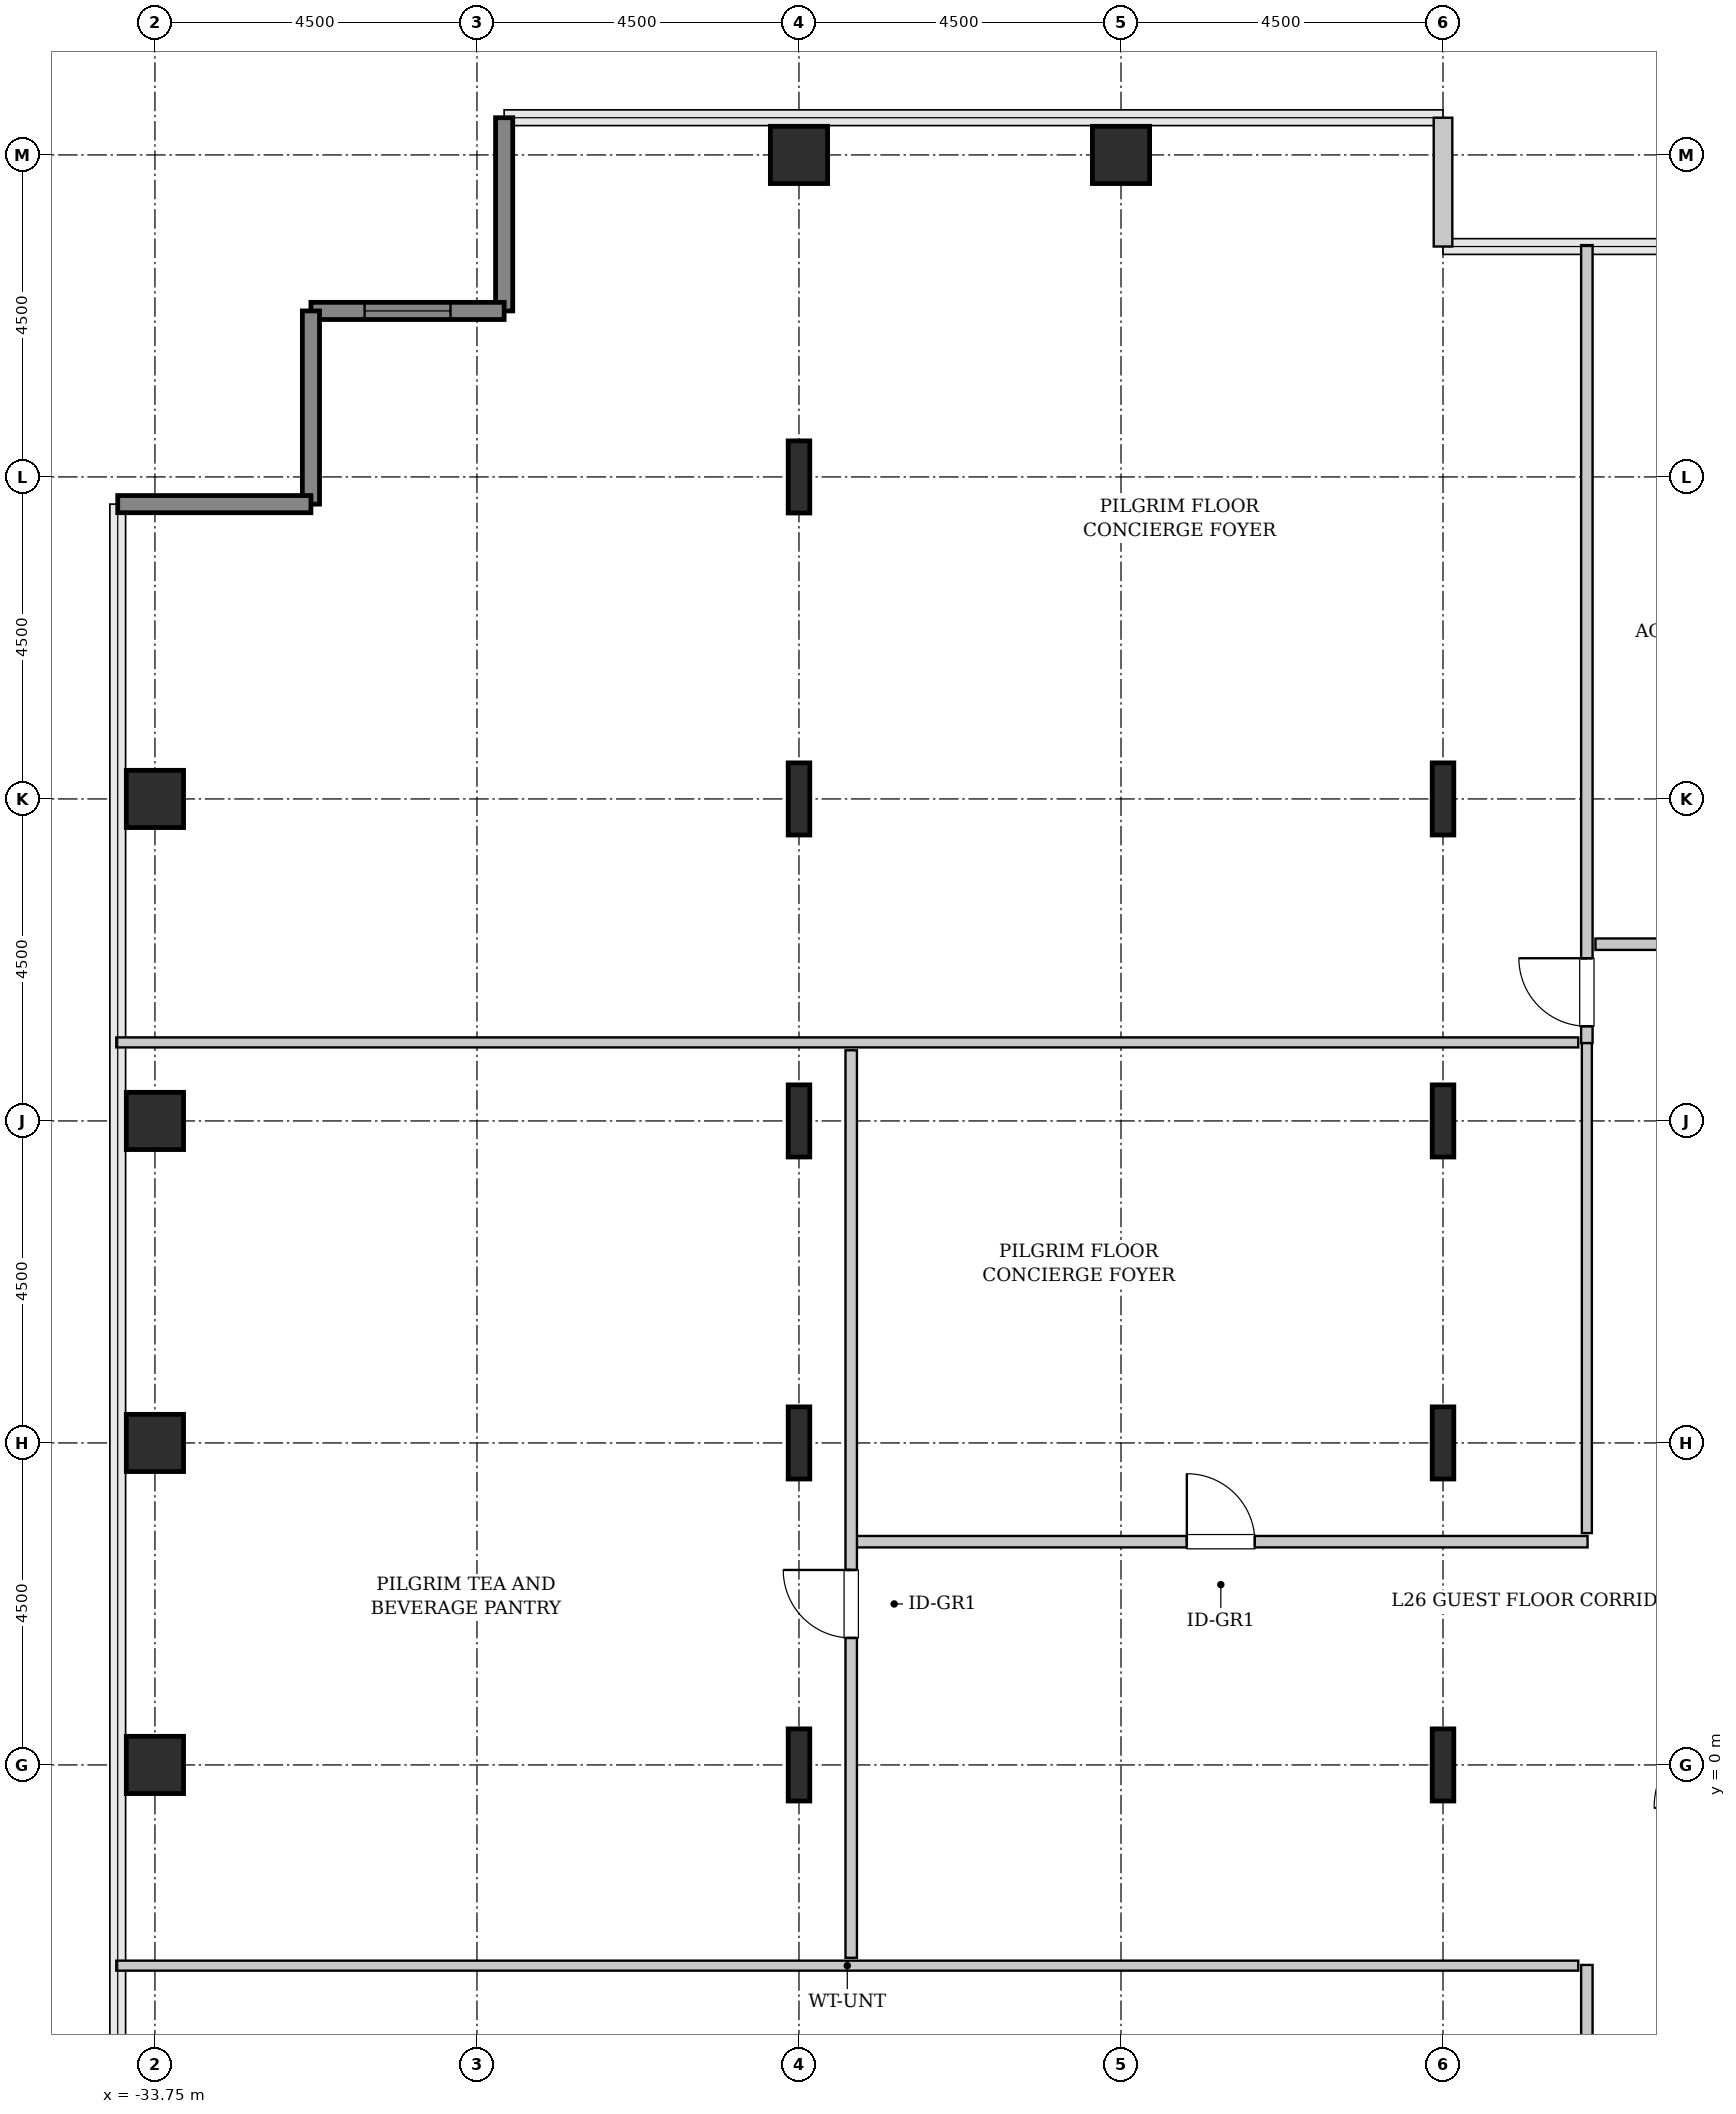
"""IFC4 building model, lengths in metres.
Left out: names, types, materials, properties, quantities, classifications, styles, units other than length and angle.
Written with IfcOpenShell. Run it as: python <this file> out.ifc"""

import sys

from ifc_helpers import new_model, si_unit, direction, frame, frame_2d, origin, origin_2d, place, context, subcontext, project, spatial, rectangle, hollow_rectangle, i_section, extrude, source, transform, mapped, element, fill, save


model = new_model("IFC4")
c1 = context("Model", 3, precision=1e-05, world=origin(), true_north=direction((0.0, 1.0)))
c2 = subcontext(c1, "Body", "Model", "MODEL_VIEW")
j1 = project(units=[si_unit("LENGTHUNIT", "METRE"), si_unit("PLANEANGLEUNIT", "RADIAN")], contexts=[c1])
p1 = place(None, origin())
s1 = spatial("IfcSite", under=j1, at=p1, CompositionType="ELEMENT")
p2 = place(p1, origin())
s2 = spatial("IfcBuilding", under=s1, at=p2, CompositionType="ELEMENT")
p3 = place(p2, frame((0.0, 0.0, 109.8)))
s3 = spatial("IfcBuildingStorey", under=s2, at=p3, CompositionType="ELEMENT", Elevation=109.8)
m1 = source(origin(), c2, "Body", "SweptSolid", [
    extrude(hollow_rectangle(XDim=0.8, YDim=0.8, WallThickness=0.04, InnerFilletRadius=0.04, OuterFilletRadius=0.08, at=origin_2d()), origin(), (0.0, 0.0, 1.0), 3.8),
])
for number, where, z_axis, x_axis in (
    (1, (-33.75, 0.0, 0.0), (0.0, 0.0, 1.0), (1.0, 0.0, 0.0)),
    (2, (-33.75, 4.5, 0.0), (0.0, 0.0, 1.0), (1.0, 0.0, 0.0)),
    (3, (-33.75, 9.0, 0.0), (0.0, 0.0, 1.0), (1.0, 0.0, 0.0)),
    (4, (-33.75, 13.5, 0.0), (0.0, 0.0, 1.0), (1.0, 0.0, 0.0)),
):
    element("IfcColumn", number, at=place(p3, frame(where, z_axis=z_axis, x_axis=x_axis)), inside=s3, PredefinedType="COLUMN", context=c2, shape_type="MappedRepresentation", body=[
        mapped(m1, transform((0.0, 0.0, 0.0), x_axis=(1.0, 0.0, 0.0), y_axis=(0.0, 1.0, 0.0), z_axis=(0.0, 0.0, 1.0), scale=1.0)),
    ])
m2 = source(origin(), c2, "Body", "SweptSolid", [
    extrude(i_section(OverallWidth=0.302, OverallDepth=1.008, WebThickness=0.021, FlangeThickness=0.04, FilletRadius=0.03, at=origin_2d()), origin(), (0.0, 0.0, 1.0), 3.8),
])
for number, where, z_axis, x_axis in (
    (5, (-24.75, 0.0, 0.0), (0.0, 0.0, 1.0), (1.0, 0.0, 0.0)),
    (6, (-24.75, 4.5, 0.0), (0.0, 0.0, 1.0), (1.0, 0.0, 0.0)),
    (7, (-24.75, 9.0, 0.0), (0.0, 0.0, 1.0), (1.0, 0.0, 0.0)),
    (8, (-24.75, 13.5, 0.0), (0.0, 0.0, 1.0), (1.0, 0.0, 0.0)),
    (9, (-24.75, 18.0, 0.0), (0.0, 0.0, 1.0), (1.0, 0.0, 0.0)),
):
    element("IfcColumn", number, at=place(p3, frame(where, z_axis=z_axis, x_axis=x_axis)), inside=s3, PredefinedType="COLUMN", context=c2, shape_type="MappedRepresentation", body=[
        mapped(m2, transform((0.0, 0.0, 0.0), x_axis=(1.0, 0.0, 0.0), y_axis=(0.0, 1.0, 0.0), z_axis=(0.0, 0.0, 1.0), scale=1.0)),
    ])
for number, where, z_axis, x_axis in (
    (10, (-24.75, 22.5, 0.0), (0.0, 0.0, 1.0), (1.0, 0.0, 0.0)),
    (11, (-20.25, 22.5, 0.0), (0.0, 0.0, 1.0), (1.0, 0.0, 0.0)),
):
    element("IfcColumn", number, at=place(p3, frame(where, z_axis=z_axis, x_axis=x_axis)), inside=s3, PredefinedType="COLUMN", context=c2, shape_type="MappedRepresentation", body=[
        mapped(m1, transform((0.0, 0.0, 0.0), x_axis=(1.0, 0.0, 0.0), y_axis=(0.0, 1.0, 0.0), z_axis=(0.0, 0.0, 1.0), scale=1.0)),
    ])
for number, where, z_axis, x_axis in (
    (12, (-15.75, 0.0, 0.0), (0.0, 0.0, 1.0), (1.0, 0.0, 0.0)),
    (13, (-15.75, 4.5, 0.0), (0.0, 0.0, 1.0), (1.0, 0.0, 0.0)),
    (14, (-15.75, 9.0, 0.0), (0.0, 0.0, 1.0), (1.0, 0.0, 0.0)),
    (15, (-15.75, 13.5, 0.0), (0.0, 0.0, 1.0), (1.0, 0.0, 0.0)),
):
    element("IfcColumn", number, at=place(p3, frame(where, z_axis=z_axis, x_axis=x_axis)), inside=s3, PredefinedType="COLUMN", context=c2, shape_type="MappedRepresentation", body=[
        mapped(m2, transform((0.0, 0.0, 0.0), x_axis=(1.0, 0.0, 0.0), y_axis=(0.0, 1.0, 0.0), z_axis=(0.0, 0.0, 1.0), scale=1.0)),
    ])
m3 = source(origin(), c2, "Body", "SweptSolid", [
    extrude(rectangle(XDim=1.8, YDim=0.26, at=frame_2d((0.9, 0.0))), origin(), (0.0, 0.0, 1.0), 3.55),
])
p4 = place(p3, frame((-15.75, 21.22, 0.0), z_axis=(0.0, 0.0, 1.0), x_axis=(0.0, 1.0, 0.0)))
e16 = element("IfcWall", 16, at=p4, inside=s3, PredefinedType="SOLIDWALL", context=c2, shape_type="MappedRepresentation", body=[
    mapped(m3, transform((0.0, 0.0, 0.0), x_axis=(1.0, 0.0, 0.0), y_axis=(0.0, 1.0, 0.0), z_axis=(0.0, 0.0, 1.0), scale=1.0)),
])
m4 = source(origin(), c2, "Body", "SweptSolid", [
    extrude(rectangle(XDim=2.7, YDim=0.24, at=frame_2d((1.35, 0.0))), origin(), (0.0, 0.0, 1.0), 3.55),
])
p5 = place(p3, frame((-28.87, 23.02, 0.0), z_axis=(0.0, 0.0, 1.0), x_axis=(0.0, -1.0, 0.0)))
e17 = element("IfcWall", 17, at=p5, inside=s3, PredefinedType="SHEAR", context=c2, shape_type="MappedRepresentation", body=[
    mapped(m4, transform((0.0, 0.0, 0.0), x_axis=(1.0, 0.0, 0.0), y_axis=(0.0, 1.0, 0.0), z_axis=(0.0, 0.0, 1.0), scale=1.0)),
])
p6 = place(p3, frame((-28.87, 20.32, 0.0), z_axis=(0.0, 0.0, 1.0), x_axis=(-1.0, 0.0, 0.0)))
e18 = element("IfcWall", 18, at=p6, inside=s3, PredefinedType="SHEAR", context=c2, shape_type="MappedRepresentation", body=[
    mapped(m4, transform((0.0, 0.0, 0.0), x_axis=(1.0, 0.0, 0.0), y_axis=(0.0, 1.0, 0.0), z_axis=(0.0, 0.0, 1.0), scale=1.0)),
])
p7 = place(p6, frame((0.75, 0.0, 0.85)))
e19 = element("IfcOpeningElement", 19, at=p7, cuts=e18, PredefinedType="OPENING", context=c2, shape_type="SweptSolid", body=[
    extrude(rectangle(XDim=1.2, YDim=1.8, at=frame_2d((0.6, 0.9))), frame((0.0, 0.13, 0.0), z_axis=(0.0, -1.0, 0.0), x_axis=(1.0, 0.0, 0.0)), (0.0, 0.0, 1.0), 0.26),
])
for number, where, z_axis, x_axis in (
    (20, (-31.57, 20.32, 0.0), (0.0, 0.0, 1.0), (0.0, -1.0, 0.0)),
    (21, (-31.57, 17.62, 0.0), (0.0, 0.0, 1.0), (-1.0, 0.0, 0.0)),
):
    element("IfcWall", number, at=place(p3, frame(where, z_axis=z_axis, x_axis=x_axis)), inside=s3, PredefinedType="SHEAR", context=c2, shape_type="MappedRepresentation", body=[
        mapped(m4, transform((0.0, 0.0, 0.0), x_axis=(1.0, 0.0, 0.0), y_axis=(0.0, 1.0, 0.0), z_axis=(0.0, 0.0, 1.0), scale=1.0)),
    ])
m5 = source(origin(), c2, "Body", "SweptSolid", [
    extrude(rectangle(XDim=18.445, YDim=0.16, at=frame_2d((9.223, 0.0))), origin(), (0.0, 0.0, 1.0), 3.535),
])
p8 = place(p3, frame((-13.74, -21.24, 0.0), z_axis=(0.0, 0.0, 1.0), x_axis=(0.0, 1.0, 0.0)))
e22 = element("IfcWall", 22, at=p8, inside=s3, PredefinedType="PARTITIONING", context=c2, shape_type="MappedRepresentation", body=[
    mapped(m5, transform((0.0, 0.0, 0.0), x_axis=(1.0, 0.0, 0.0), y_axis=(0.0, 1.0, 0.0), z_axis=(0.0, 0.0, 1.0), scale=1.0)),
])
p9 = place(p8, frame((13.613, 0.0, 0.0)))
e23 = element("IfcOpeningElement", 23, at=p9, cuts=e22, PredefinedType="OPENING", context=c2, shape_type="SweptSolid", body=[
    extrude(rectangle(XDim=0.95, YDim=2.1, at=frame_2d((0.475, 1.05))), frame((0.0, 0.09, 0.0), z_axis=(0.0, -1.0, 0.0), x_axis=(1.0, 0.0, 0.0)), (0.0, 0.0, 1.0), 0.18),
])
m6 = source(origin(), c2, "Body", "SweptSolid", [
    extrude(rectangle(XDim=20.43, YDim=0.14, at=frame_2d((10.215, 0.0))), origin(), (0.0, 0.0, 1.0), 3.535),
])
p10 = place(p3, frame((-34.29, -2.805, 0.0), z_axis=(0.0, 0.0, 1.0), x_axis=(1.0, 0.0, 0.0)))
e24 = element("IfcWall", 24, at=p10, inside=s3, PredefinedType="PARTITIONING", context=c2, shape_type="MappedRepresentation", body=[
    mapped(m6, transform((0.0, 0.0, 0.0), x_axis=(1.0, 0.0, 0.0), y_axis=(0.0, 1.0, 0.0), z_axis=(0.0, 0.0, 1.0), scale=1.0)),
])
m7 = source(origin(), c2, "Body", "SweptSolid", [
    extrude(rectangle(XDim=11.153, YDim=0.16, at=frame_2d((5.576, 0.0))), origin(), (0.0, 0.0, 1.0), 3.535),
])
p11 = place(p3, frame((-13.74, 10.087, 0.0), z_axis=(0.0, 0.0, 1.0), x_axis=(0.0, 1.0, 0.0)))
e25 = element("IfcWall", 25, at=p11, inside=s3, PredefinedType="PARTITIONING", context=c2, shape_type="MappedRepresentation", body=[
    mapped(m7, transform((0.0, 0.0, 0.0), x_axis=(1.0, 0.0, 0.0), y_axis=(0.0, 1.0, 0.0), z_axis=(0.0, 0.0, 1.0), scale=1.0)),
])
p12 = place(p11, frame((0.236, 0.0, 0.0)))
e26 = element("IfcOpeningElement", 26, at=p12, cuts=e25, PredefinedType="OPENING", context=c2, shape_type="SweptSolid", body=[
    extrude(rectangle(XDim=0.95, YDim=2.1, at=frame_2d((0.475, 1.05))), frame((0.0, 0.09, 0.0), z_axis=(0.0, -1.0, 0.0), x_axis=(1.0, 0.0, 0.0)), (0.0, 0.0, 1.0), 0.18),
])
p13 = place(p3, frame((-34.29, 10.097, 0.0), z_axis=(0.0, 0.0, 1.0), x_axis=(1.0, 0.0, 0.0)))
e27 = element("IfcWall", 27, at=p13, inside=s3, PredefinedType="PARTITIONING", context=c2, shape_type="MappedRepresentation", body=[
    mapped(m6, transform((0.0, 0.0, 0.0), x_axis=(1.0, 0.0, 0.0), y_axis=(0.0, 1.0, 0.0), z_axis=(0.0, 0.0, 1.0), scale=1.0)),
])
m8 = source(origin(), c2, "Body", "SweptSolid", [
    extrude(rectangle(XDim=10.25, YDim=0.16, at=frame_2d((5.125, 0.0))), origin(), (0.0, 0.0, 1.0), 3.535),
])
p14 = place(p3, frame((-23.98, 3.12, 0.0), z_axis=(0.0, 0.0, 1.0), x_axis=(1.0, 0.0, 0.0)))
e28 = element("IfcWall", 28, at=p14, inside=s3, PredefinedType="PARTITIONING", context=c2, shape_type="MappedRepresentation", body=[
    mapped(m8, transform((0.0, 0.0, 0.0), x_axis=(1.0, 0.0, 0.0), y_axis=(0.0, 1.0, 0.0), z_axis=(0.0, 0.0, 1.0), scale=1.0)),
])
p15 = place(p14, frame((4.65, 0.0, 0.0)))
e29 = element("IfcOpeningElement", 29, at=p15, cuts=e28, PredefinedType="OPENING", context=c2, shape_type="SweptSolid", body=[
    extrude(rectangle(XDim=0.95, YDim=2.1, at=frame_2d((0.475, 1.05))), frame((0.0, 0.09, 0.0), z_axis=(0.0, -1.0, 0.0), x_axis=(1.0, 0.0, 0.0)), (0.0, 0.0, 1.0), 0.18),
])
m9 = source(origin(), c2, "Body", "SweptSolid", [
    extrude(rectangle(XDim=6.847, YDim=0.14, at=frame_2d((3.424, 0.0))), origin(), (0.0, 0.0, 1.0), 3.535),
])
p16 = place(p3, frame((-13.74, 3.24, 0.0), z_axis=(0.0, 0.0, 1.0), x_axis=(0.0, 1.0, 0.0)))
e30 = element("IfcWall", 30, at=p16, inside=s3, PredefinedType="PARTITIONING", context=c2, shape_type="MappedRepresentation", body=[
    mapped(m9, transform((0.0, 0.0, 0.0), x_axis=(1.0, 0.0, 0.0), y_axis=(0.0, 1.0, 0.0), z_axis=(0.0, 0.0, 1.0), scale=1.0)),
])
m10 = source(origin(), c2, "Body", "SweptSolid", [
    extrude(rectangle(XDim=12.683, YDim=0.16, at=frame_2d((6.341, 0.0))), origin(), (0.0, 0.0, 1.0), 3.535),
])
p17 = place(p3, frame((-24.02, -2.695, 0.0), z_axis=(0.0, 0.0, 1.0), x_axis=(0.0, 1.0, 0.0)))
e31 = element("IfcWall", 31, at=p17, inside=s3, PredefinedType="PARTITIONING", context=c2, shape_type="MappedRepresentation", body=[
    mapped(m10, transform((0.0, 0.0, 0.0), x_axis=(1.0, 0.0, 0.0), y_axis=(0.0, 1.0, 0.0), z_axis=(0.0, 0.0, 1.0), scale=1.0)),
])
p18 = place(p17, frame((4.47, 0.0, 0.0)))
e32 = element("IfcOpeningElement", 32, at=p18, cuts=e31, PredefinedType="OPENING", context=c2, shape_type="SweptSolid", body=[
    extrude(rectangle(XDim=0.95, YDim=2.1, at=frame_2d((0.475, 1.05))), frame((0.0, 0.09, 0.0), z_axis=(0.0, -1.0, 0.0), x_axis=(1.0, 0.0, 0.0)), (0.0, 0.0, 1.0), 0.18),
])
m11 = source(origin(), c2, "Body", "SweptSolid", [
    extrude(rectangle(XDim=4.125, YDim=0.16, at=frame_2d((2.062, 0.0))), origin(), (0.0, 0.0, 1.0), 3.535),
])
p19 = place(p3, frame((-13.62, 11.47, 0.0), z_axis=(0.0, 0.0, 1.0), x_axis=(1.0, 0.0, 0.0)))
e33 = element("IfcWall", 33, at=p19, inside=s3, PredefinedType="PARTITIONING", context=c2, shape_type="MappedRepresentation", body=[
    mapped(m11, transform((0.0, 0.0, 0.0), x_axis=(1.0, 0.0, 0.0), y_axis=(0.0, 1.0, 0.0), z_axis=(0.0, 0.0, 1.0), scale=1.0)),
])
p20 = place(p19, frame((1.587, 0.0, 0.0)))
e34 = element("IfcOpeningElement", 34, at=p20, cuts=e33, PredefinedType="OPENING", context=c2, shape_type="SweptSolid", body=[
    extrude(rectangle(XDim=0.95, YDim=2.1, at=frame_2d((0.475, 1.05))), frame((0.0, 0.09, 0.0), z_axis=(0.0, -1.0, 0.0), x_axis=(1.0, 0.0, 0.0)), (0.0, 0.0, 1.0), 0.18),
])
m12 = source(origin(), c2, "Body", "SweptSolid", [
    extrude(rectangle(XDim=1.2, YDim=1.8, at=frame_2d((0.6, 0.9))), frame((0.0, 0.03, 0.0), z_axis=(0.0, -1.0, 0.0), x_axis=(1.0, 0.0, 0.0)), (0.0, 0.0, 1.0), 0.06),
])
p21 = place(p7, origin())
e35 = element("IfcWindow", 35, at=p21, inside=s3, PartitioningType="SINGLE_PANEL", PredefinedType="WINDOW", context=c2, shape_type="MappedRepresentation", body=[
    mapped(m12, transform((0.0, 0.0, 0.0), x_axis=(1.0, 0.0, 0.0), y_axis=(0.0, 1.0, 0.0), z_axis=(0.0, 0.0, 1.0), scale=1.0)),
])
fill(e19, e35)
m13 = source(origin(), c2, "Body", "SweptSolid", [
    extrude(rectangle(XDim=0.95, YDim=2.1, at=frame_2d((0.475, 1.05))), frame((0.0, 0.025, 0.0), z_axis=(0.0, -1.0, 0.0), x_axis=(1.0, 0.0, 0.0)), (0.0, 0.0, 1.0), 0.05),
])
p22 = place(p12, origin())
e36 = element("IfcDoor", 36, at=p22, inside=s3, OperationType="SINGLE_SWING_RIGHT", PredefinedType="DOOR", context=c2, shape_type="MappedRepresentation", body=[
    mapped(m13, transform((0.0, 0.0, 0.0), x_axis=(1.0, 0.0, 0.0), y_axis=(0.0, 1.0, 0.0), z_axis=(0.0, 0.0, 1.0), scale=1.0)),
])
fill(e26, e36)
p23 = place(p15, origin())
e37 = element("IfcDoor", 37, at=p23, inside=s3, OperationType="SINGLE_SWING_LEFT", PredefinedType="DOOR", context=c2, shape_type="MappedRepresentation", body=[
    mapped(m13, transform((0.0, 0.0, 0.0), x_axis=(1.0, 0.0, 0.0), y_axis=(0.0, 1.0, 0.0), z_axis=(0.0, 0.0, 1.0), scale=1.0)),
])
fill(e29, e37)
p24 = place(p18, origin())
e38 = element("IfcDoor", 38, at=p24, inside=s3, OperationType="SINGLE_SWING_RIGHT", PredefinedType="DOOR", context=c2, shape_type="MappedRepresentation", body=[
    mapped(m13, transform((0.0, 0.0, 0.0), x_axis=(1.0, 0.0, 0.0), y_axis=(0.0, 1.0, 0.0), z_axis=(0.0, 0.0, 1.0), scale=1.0)),
])
fill(e32, e38)
save(model, sys.argv[1])
